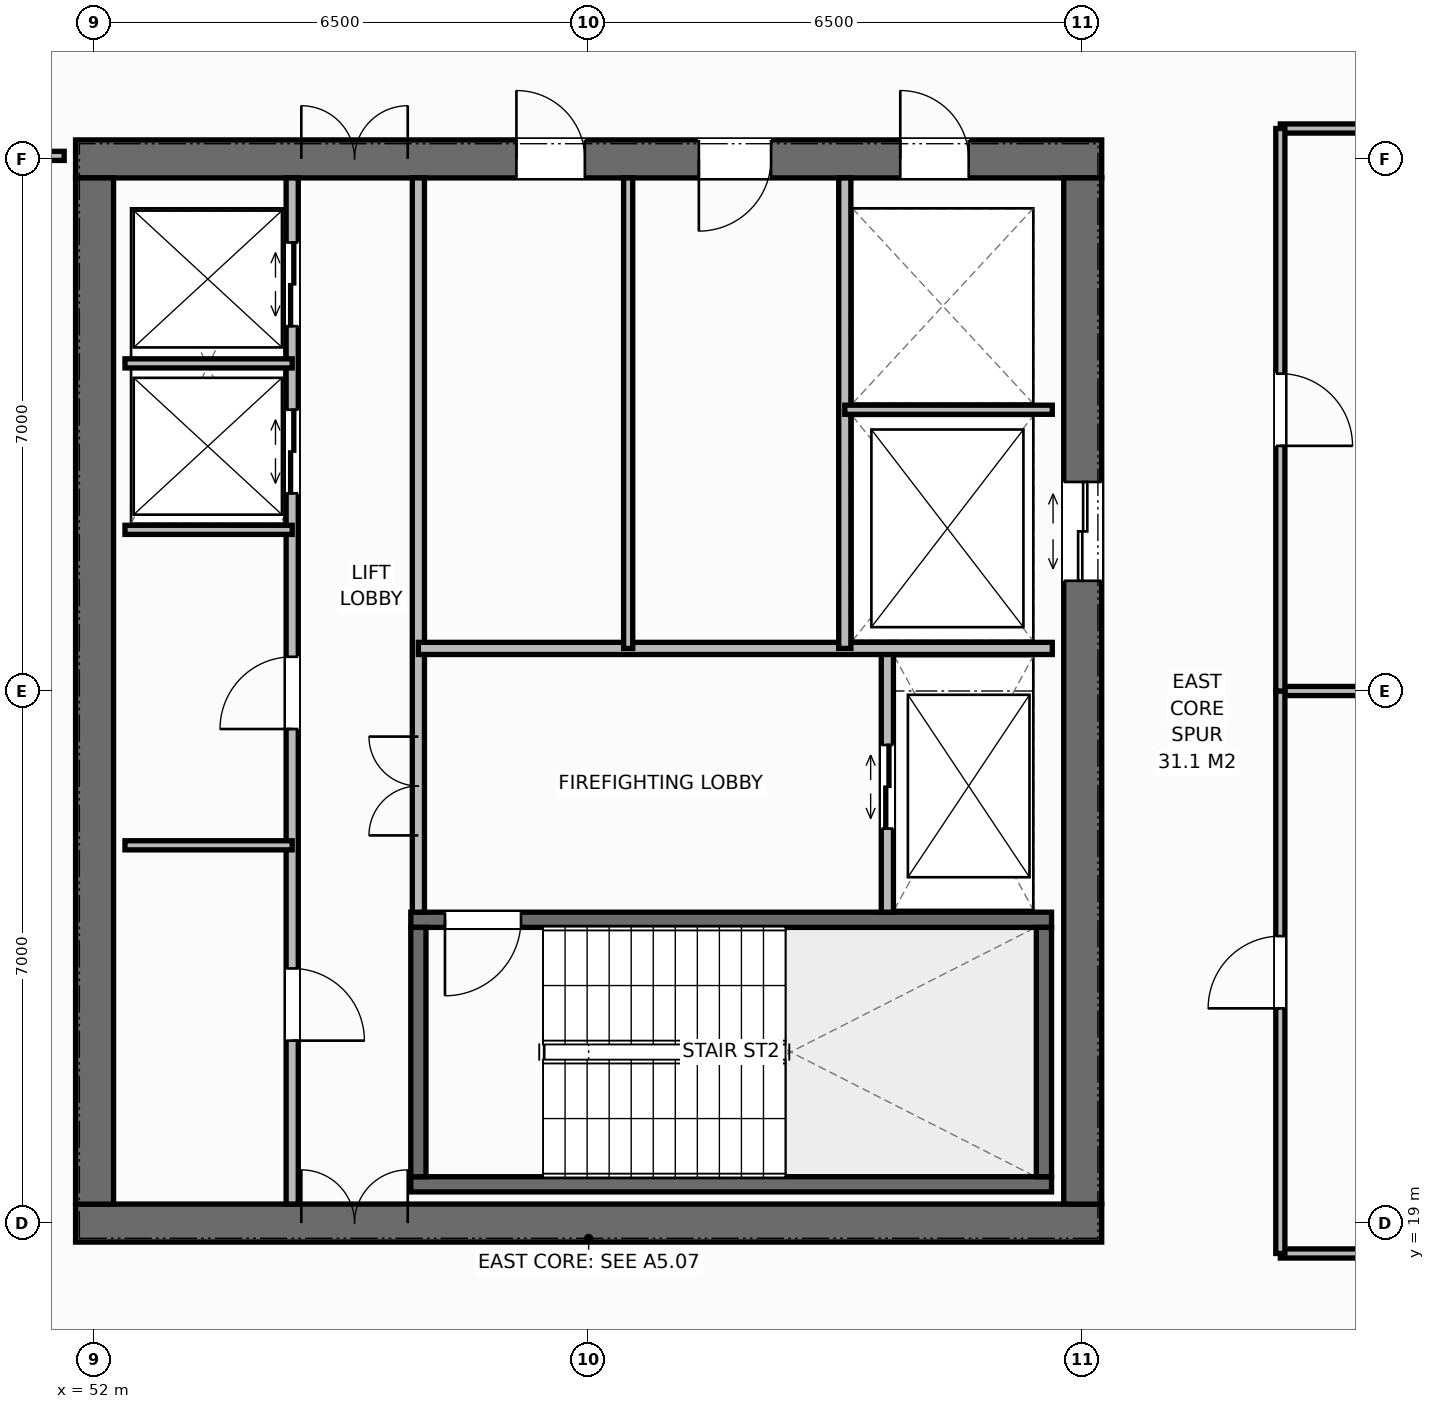
"""IFC4 building model, lengths in metres.
Left out: names, types, materials, properties, quantities, classifications, styles, units other than length and angle.
Written with IfcOpenShell. Run it as: python <this file> out.ifc"""

import sys

from ifc_helpers import new_model, si_unit, direction, frame, frame_2d, origin, place, context, subcontext, project, spatial, rectangle, extrude, element, fill, save


model = new_model("IFC4")
c1 = context("Model", 3, precision=1e-05, world=origin(), true_north=direction((0.0, 1.0)))
c2 = subcontext(c1, "Body", "Model", "MODEL_VIEW")
j1 = project(units=[si_unit("LENGTHUNIT", "METRE"), si_unit("PLANEANGLEUNIT", "RADIAN")], contexts=[c1])
p1 = place(None, origin())
s1 = spatial("IfcSite", under=j1, at=p1, CompositionType="ELEMENT")
p2 = place(p1, origin())
s2 = spatial("IfcBuilding", under=s1, at=p2, CompositionType="ELEMENT")
p3 = place(p2, frame((0.0, 0.0, 306.4)))
s3 = spatial("IfcBuildingStorey", under=s2, at=p3, CompositionType="ELEMENT", Elevation=306.4)
p4 = place(p3, frame((51.75, 19.0, 0.0), z_axis=(0.0, 0.0, 1.0), x_axis=(1.0, 0.0, 0.0)))
e1 = element("IfcWall", 1, at=p4, inside=s3, PredefinedType="SHEAR", context=c2, shape_type="SweptSolid", body=[
    extrude(rectangle(XDim=13.5, YDim=0.5, at=frame_2d((6.75, 0.0))), origin(), (0.0, 0.0, 1.0), 4.0),
])
p5 = place(p4, frame((2.97, 0.0, 0.0)))
e2 = element("IfcOpeningElement", 2, at=p5, cuts=e1, PredefinedType="OPENING", context=c2, shape_type="SweptSolid", body=[
    extrude(rectangle(XDim=1.4, YDim=2.2, at=frame_2d((0.7, 1.1))), frame((0.0, 0.26, 0.0), z_axis=(0.0, -1.0, 0.0), x_axis=(1.0, 0.0, 0.0)), (0.0, 0.0, 1.0), 0.52),
])
p6 = place(p3, frame((51.75, 33.0, 0.0), z_axis=(0.0, 0.0, 1.0), x_axis=(1.0, 0.0, 0.0)))
e3 = element("IfcWall", 3, at=p6, inside=s3, PredefinedType="SHEAR", context=c2, shape_type="SweptSolid", body=[
    extrude(rectangle(XDim=13.5, YDim=0.5, at=frame_2d((6.75, 0.0))), origin(), (0.0, 0.0, 1.0), 4.0),
])
p7 = place(p6, frame((2.97, 0.0, 0.0)))
e4 = element("IfcOpeningElement", 4, at=p7, cuts=e3, PredefinedType="OPENING", context=c2, shape_type="SweptSolid", body=[
    extrude(rectangle(XDim=1.4, YDim=2.2, at=frame_2d((0.7, 1.1))), frame((0.0, 0.26, 0.0), z_axis=(0.0, -1.0, 0.0), x_axis=(1.0, 0.0, 0.0)), (0.0, 0.0, 1.0), 0.52),
])
p8 = place(p6, frame((10.85, 0.0, 0.0)))
e5 = element("IfcOpeningElement", 5, at=p8, cuts=e3, PredefinedType="OPENING", context=c2, shape_type="SweptSolid", body=[
    extrude(rectangle(XDim=0.9, YDim=2.15, at=frame_2d((0.45, 1.075))), frame((0.0, 0.26, 0.0), z_axis=(0.0, -1.0, 0.0), x_axis=(1.0, 0.0, 0.0)), (0.0, 0.0, 1.0), 0.52),
])
p9 = place(p6, frame((5.8, 0.0, 0.0)))
e6 = element("IfcOpeningElement", 6, at=p9, cuts=e3, PredefinedType="OPENING", context=c2, shape_type="SweptSolid", body=[
    extrude(rectangle(XDim=0.9, YDim=2.15, at=frame_2d((0.45, 1.075))), frame((0.0, 0.26, 0.0), z_axis=(0.0, -1.0, 0.0), x_axis=(1.0, 0.0, 0.0)), (0.0, 0.0, 1.0), 0.52),
])
p10 = place(p6, frame((8.2, 0.0, 0.0)))
e7 = element("IfcOpeningElement", 7, at=p10, cuts=e3, PredefinedType="OPENING", context=c2, shape_type="SweptSolid", body=[
    extrude(rectangle(XDim=0.95, YDim=2.15, at=frame_2d((0.475, 1.075))), frame((0.0, 0.26, 0.0), z_axis=(0.0, -1.0, 0.0), x_axis=(1.0, 0.0, 0.0)), (0.0, 0.0, 1.0), 0.52),
])
p11 = place(p3, frame((52.0, 19.25, 0.0), z_axis=(0.0, 0.0, 1.0), x_axis=(0.0, 1.0, 0.0)))
e8 = element("IfcWall", 8, at=p11, inside=s3, PredefinedType="SHEAR", context=c2, shape_type="SweptSolid", body=[
    extrude(rectangle(XDim=13.5, YDim=0.5, at=frame_2d((6.75, 0.0))), origin(), (0.0, 0.0, 1.0), 4.0),
])
p12 = place(p3, frame((65.0, 19.25, 0.0), z_axis=(0.0, 0.0, 1.0), x_axis=(0.0, 1.0, 0.0)))
e9 = element("IfcWall", 9, at=p12, inside=s3, PredefinedType="SHEAR", context=c2, shape_type="SweptSolid", body=[
    extrude(rectangle(XDim=13.5, YDim=0.5, at=frame_2d((6.75, 0.0))), origin(), (0.0, 0.0, 1.0), 4.0),
])
p13 = place(p12, frame((8.2, 0.0, 0.0)))
e10 = element("IfcOpeningElement", 10, at=p13, cuts=e9, PredefinedType="OPENING", context=c2, shape_type="SweptSolid", body=[
    extrude(rectangle(XDim=1.3, YDim=2.2, at=frame_2d((0.65, 1.1))), frame((0.0, 0.26, 0.0), z_axis=(0.0, -1.0, 0.0), x_axis=(1.0, 0.0, 0.0)), (0.0, 0.0, 1.0), 0.52),
])
p14 = place(p3, frame((56.16, 19.51, 0.0), z_axis=(0.0, 0.0, 1.0), x_axis=(1.0, 0.0, 0.0)))
e11 = element("IfcWall", 11, at=p14, inside=s3, PredefinedType="SHEAR", context=c2, shape_type="SweptSolid", body=[
    extrude(rectangle(XDim=8.43, YDim=0.2, at=frame_2d((4.215, 0.0))), origin(), (0.0, 0.0, 1.0), 4.0),
])
p15 = place(p3, frame((56.16, 22.99, 0.0), z_axis=(0.0, 0.0, 1.0), x_axis=(1.0, 0.0, 0.0)))
e12 = element("IfcWall", 12, at=p15, inside=s3, PredefinedType="SHEAR", context=c2, shape_type="SweptSolid", body=[
    extrude(rectangle(XDim=8.43, YDim=0.2, at=frame_2d((4.215, 0.0))), origin(), (0.0, 0.0, 1.0), 4.0),
])
p16 = place(p15, frame((0.45, 0.0, 0.0)))
e13 = element("IfcOpeningElement", 13, at=p16, cuts=e12, PredefinedType="OPENING", context=c2, shape_type="SweptSolid", body=[
    extrude(rectangle(XDim=1.0, YDim=2.15, at=frame_2d((0.5, 1.075))), frame((0.0, 0.11, 0.0), z_axis=(0.0, -1.0, 0.0), x_axis=(1.0, 0.0, 0.0)), (0.0, 0.0, 1.0), 0.22),
])
for number, where, z_axis, x_axis in (
    (14, (56.26, 19.61, 0.0), (0.0, 0.0, 1.0), (0.0, 1.0, 0.0)),
    (15, (64.49, 19.61, 0.0), (0.0, 0.0, 1.0), (0.0, 1.0, 0.0)),
):
    element("IfcWall", number, at=place(p3, frame(where, z_axis=z_axis, x_axis=x_axis)), inside=s3, PredefinedType="SHEAR", context=c2, shape_type="SweptSolid", body=[
        extrude(rectangle(XDim=3.28, YDim=0.2, at=frame_2d((1.64, 0.0))), origin(), (0.0, 0.0, 1.0), 4.0),
    ])
p17 = place(p3, frame((54.6, 19.25, 0.0), z_axis=(0.0, 0.0, 1.0), x_axis=(0.0, 1.0, 0.0)))
e16 = element("IfcWall", 16, at=p17, inside=s3, PredefinedType="STANDARD", context=c2, shape_type="SweptSolid", body=[
    extrude(rectangle(XDim=13.5, YDim=0.16, at=frame_2d((6.75, 0.0))), origin(), (0.0, 0.0, 1.0), 3.72),
])
p18 = place(p17, frame((2.15, 0.0, 0.0)))
e17 = element("IfcOpeningElement", 17, at=p18, cuts=e16, PredefinedType="OPENING", context=c2, shape_type="SweptSolid", body=[
    extrude(rectangle(XDim=0.95, YDim=2.15, at=frame_2d((0.475, 1.075))), frame((0.0, 0.09, 0.0), z_axis=(0.0, -1.0, 0.0), x_axis=(1.0, 0.0, 0.0)), (0.0, 0.0, 1.0), 0.18),
])
p19 = place(p17, frame((6.25, 0.0, 0.0)))
e18 = element("IfcOpeningElement", 18, at=p19, cuts=e16, PredefinedType="OPENING", context=c2, shape_type="SweptSolid", body=[
    extrude(rectangle(XDim=0.95, YDim=2.15, at=frame_2d((0.475, 1.075))), frame((0.0, 0.09, 0.0), z_axis=(0.0, -1.0, 0.0), x_axis=(1.0, 0.0, 0.0)), (0.0, 0.0, 1.0), 0.18),
])
p20 = place(p17, frame((9.35, 0.0, 0.0)))
e19 = element("IfcOpeningElement", 19, at=p20, cuts=e16, PredefinedType="OPENING", context=c2, shape_type="SweptSolid", body=[
    extrude(rectangle(XDim=1.1, YDim=2.2, at=frame_2d((0.55, 1.1))), frame((0.0, 0.09, 0.0), z_axis=(0.0, -1.0, 0.0), x_axis=(1.0, 0.0, 0.0)), (0.0, 0.0, 1.0), 0.18),
])
p21 = place(p17, frame((11.55, 0.0, 0.0)))
e20 = element("IfcOpeningElement", 20, at=p21, cuts=e16, PredefinedType="OPENING", context=c2, shape_type="SweptSolid", body=[
    extrude(rectangle(XDim=1.1, YDim=2.2, at=frame_2d((0.55, 1.1))), frame((0.0, 0.09, 0.0), z_axis=(0.0, -1.0, 0.0), x_axis=(1.0, 0.0, 0.0)), (0.0, 0.0, 1.0), 0.18),
])
p22 = place(p3, frame((56.26, 23.09, 0.0), z_axis=(0.0, 0.0, 1.0), x_axis=(0.0, 1.0, 0.0)))
e21 = element("IfcWall", 21, at=p22, inside=s3, PredefinedType="STANDARD", context=c2, shape_type="SweptSolid", body=[
    extrude(rectangle(XDim=9.66, YDim=0.16, at=frame_2d((4.83, 0.0))), origin(), (0.0, 0.0, 1.0), 3.72),
])
p23 = place(p22, frame((1.01, 0.0, 0.0)))
e22 = element("IfcOpeningElement", 22, at=p23, cuts=e21, PredefinedType="OPENING", context=c2, shape_type="SweptSolid", body=[
    extrude(rectangle(XDim=1.3, YDim=2.2, at=frame_2d((0.65, 1.1))), frame((0.0, 0.09, 0.0), z_axis=(0.0, -1.0, 0.0), x_axis=(1.0, 0.0, 0.0)), (0.0, 0.0, 1.0), 0.18),
])
for number, where, z_axis, x_axis in (
    (23, (52.4, 23.97, 0.0), (0.0, 0.0, 1.0), (1.0, 0.0, 0.0)),
    (24, (52.4, 28.12, 0.0), (0.0, 0.0, 1.0), (1.0, 0.0, 0.0)),
    (25, (52.4, 30.31, 0.0), (0.0, 0.0, 1.0), (1.0, 0.0, 0.0)),
):
    element("IfcWall", number, at=place(p3, frame(where, z_axis=z_axis, x_axis=x_axis)), inside=s3, PredefinedType="PARTITIONING", context=c2, shape_type="SweptSolid", body=[
        extrude(rectangle(XDim=2.2, YDim=0.12, at=frame_2d((1.1, 0.0))), origin(), (0.0, 0.0, 1.0), 3.72),
    ])
p24 = place(p3, frame((62.43, 23.09, 0.0), z_axis=(0.0, 0.0, 1.0), x_axis=(0.0, 1.0, 0.0)))
e26 = element("IfcWall", 26, at=p24, inside=s3, PredefinedType="STANDARD", context=c2, shape_type="SweptSolid", body=[
    extrude(rectangle(XDim=3.47, YDim=0.16, at=frame_2d((1.735, 0.0))), origin(), (0.0, 0.0, 1.0), 3.72),
])
p25 = place(p24, frame((1.1, 0.0, 0.0)))
e27 = element("IfcOpeningElement", 27, at=p25, cuts=e26, PredefinedType="OPENING", context=c2, shape_type="SweptSolid", body=[
    extrude(rectangle(XDim=1.1, YDim=2.2, at=frame_2d((0.55, 1.1))), frame((0.0, 0.09, 0.0), z_axis=(0.0, -1.0, 0.0), x_axis=(1.0, 0.0, 0.0)), (0.0, 0.0, 1.0), 0.18),
])
p26 = place(p3, frame((56.26, 26.56, 0.0), z_axis=(0.0, 0.0, 1.0), x_axis=(1.0, 0.0, 0.0)))
e28 = element("IfcWall", 28, at=p26, inside=s3, PredefinedType="STANDARD", context=c2, shape_type="SweptSolid", body=[
    extrude(rectangle(XDim=8.34, YDim=0.16, at=frame_2d((4.17, 0.0))), origin(), (0.0, 0.0, 1.0), 3.72),
])
p27 = place(p3, frame((61.87, 26.56, 0.0), z_axis=(0.0, 0.0, 1.0), x_axis=(0.0, 1.0, 0.0)))
e29 = element("IfcWall", 29, at=p27, inside=s3, PredefinedType="STANDARD", context=c2, shape_type="SweptSolid", body=[
    extrude(rectangle(XDim=6.19, YDim=0.16, at=frame_2d((3.095, 0.0))), origin(), (0.0, 0.0, 1.0), 3.72),
])
p28 = place(p3, frame((61.87, 29.7, 0.0), z_axis=(0.0, 0.0, 1.0), x_axis=(1.0, 0.0, 0.0)))
e30 = element("IfcWall", 30, at=p28, inside=s3, PredefinedType="PARTITIONING", context=c2, shape_type="SweptSolid", body=[
    extrude(rectangle(XDim=2.73, YDim=0.12, at=frame_2d((1.365, 0.0))), origin(), (0.0, 0.0, 1.0), 3.72),
])
p29 = place(p3, frame((59.02, 26.56, 0.0), z_axis=(0.0, 0.0, 1.0), x_axis=(0.0, 1.0, 0.0)))
e31 = element("IfcWall", 31, at=p29, inside=s3, PredefinedType="PARTITIONING", context=c2, shape_type="SweptSolid", body=[
    extrude(rectangle(XDim=6.19, YDim=0.12, at=frame_2d((3.095, 0.0))), origin(), (0.0, 0.0, 1.0), 3.72),
])
p30 = place(p3, frame((48.0, 33.04, 0.0), z_axis=(0.0, 0.0, 1.0), x_axis=(1.0, 0.0, 0.0)))
e32 = element("IfcWall", 32, at=p30, inside=s3, PredefinedType="PARTITIONING", context=c2, shape_type="SweptSolid", body=[
    extrude(rectangle(XDim=3.6, YDim=0.12, at=frame_2d((1.8, 0.0))), origin(), (0.0, 0.0, 1.0), 3.46),
])
p31 = place(p30, frame((1.1, 0.0, 0.0)))
e33 = element("IfcOpeningElement", 33, at=p31, cuts=e32, PredefinedType="OPENING", context=c2, shape_type="SweptSolid", body=[
    extrude(rectangle(XDim=0.95, YDim=2.15, at=frame_2d((0.475, 1.075))), frame((0.0, 0.07, 0.0), z_axis=(0.0, -1.0, 0.0), x_axis=(1.0, 0.0, 0.0)), (0.0, 0.0, 1.0), 0.14),
])
for number, where, z_axis, x_axis in (
    (34, (67.6, 18.6, 0.0), (0.0, 0.0, 1.0), (1.0, 0.0, 0.0)),
    (35, (67.6, 33.4, 0.0), (0.0, 0.0, 1.0), (1.0, 0.0, 0.0)),
    (36, (67.6, 26.0, 0.0), (0.0, 0.0, 1.0), (1.0, 0.0, 0.0)),
):
    element("IfcWall", number, at=place(p3, frame(where, z_axis=z_axis, x_axis=x_axis)), inside=s3, PredefinedType="PARTITIONING", context=c2, shape_type="SweptSolid", body=[
        extrude(rectangle(XDim=6.48, YDim=0.12, at=frame_2d((3.24, 0.0))), origin(), (0.0, 0.0, 1.0), 3.72),
    ])
p32 = place(p3, frame((67.6, 18.6, 0.0), z_axis=(0.0, 0.0, 1.0), x_axis=(0.0, 1.0, 0.0)))
e37 = element("IfcWall", 37, at=p32, inside=s3, PredefinedType="PARTITIONING", context=c2, shape_type="SweptSolid", body=[
    extrude(rectangle(XDim=7.4, YDim=0.12, at=frame_2d((3.7, 0.0))), origin(), (0.0, 0.0, 1.0), 3.72),
])
p33 = place(p32, frame((3.225, 0.0, 0.0)))
e38 = element("IfcOpeningElement", 38, at=p33, cuts=e37, PredefinedType="OPENING", context=c2, shape_type="SweptSolid", body=[
    extrude(rectangle(XDim=0.95, YDim=2.15, at=frame_2d((0.475, 1.075))), frame((0.0, 0.07, 0.0), z_axis=(0.0, -1.0, 0.0), x_axis=(1.0, 0.0, 0.0)), (0.0, 0.0, 1.0), 0.14),
])
p34 = place(p3, frame((67.6, 26.0, 0.0), z_axis=(0.0, 0.0, 1.0), x_axis=(0.0, 1.0, 0.0)))
e39 = element("IfcWall", 39, at=p34, inside=s3, PredefinedType="PARTITIONING", context=c2, shape_type="SweptSolid", body=[
    extrude(rectangle(XDim=7.4, YDim=0.12, at=frame_2d((3.7, 0.0))), origin(), (0.0, 0.0, 1.0), 3.72),
])
p35 = place(p34, frame((3.225, 0.0, 0.0)))
e40 = element("IfcOpeningElement", 40, at=p35, cuts=e39, PredefinedType="OPENING", context=c2, shape_type="SweptSolid", body=[
    extrude(rectangle(XDim=0.95, YDim=2.15, at=frame_2d((0.475, 1.075))), frame((0.0, 0.07, 0.0), z_axis=(0.0, -1.0, 0.0), x_axis=(1.0, 0.0, 0.0)), (0.0, 0.0, 1.0), 0.14),
])
p36 = place(p5, origin())
e41 = element("IfcDoor", 41, at=p36, inside=s3, OperationType="DOUBLE_DOOR_SINGLE_SWING", PredefinedType="DOOR", context=c2, shape_type="SweptSolid", body=[
    extrude(rectangle(XDim=1.4, YDim=2.2, at=frame_2d((0.7, 1.1))), frame((0.0, 0.075, 0.0), z_axis=(0.0, -1.0, 0.0), x_axis=(1.0, 0.0, 0.0)), (0.0, 0.0, 1.0), 0.05),
])
fill(e2, e41)
p37 = place(p7, origin())
e42 = element("IfcDoor", 42, at=p37, inside=s3, OperationType="DOUBLE_DOOR_SINGLE_SWING", PredefinedType="DOOR", context=c2, shape_type="SweptSolid", body=[
    extrude(rectangle(XDim=1.4, YDim=2.2, at=frame_2d((0.7, 1.1))), frame((0.0, -0.025, 0.0), z_axis=(0.0, -1.0, 0.0), x_axis=(1.0, 0.0, 0.0)), (0.0, 0.0, 1.0), 0.05),
])
fill(e4, e42)
p38 = place(p18, origin())
e43 = element("IfcDoor", 43, at=p38, inside=s3, OperationType="SINGLE_SWING_RIGHT", PredefinedType="DOOR", context=c2, shape_type="SweptSolid", body=[
    extrude(rectangle(XDim=0.95, YDim=2.15, at=frame_2d((0.475, 1.075))), frame((0.0, 0.025, 0.0), z_axis=(0.0, -1.0, 0.0), x_axis=(1.0, 0.0, 0.0)), (0.0, 0.0, 1.0), 0.05),
])
fill(e17, e43)
p39 = place(p19, origin())
e44 = element("IfcDoor", 44, at=p39, inside=s3, OperationType="SINGLE_SWING_LEFT", PredefinedType="DOOR", context=c2, shape_type="SweptSolid", body=[
    extrude(rectangle(XDim=0.95, YDim=2.15, at=frame_2d((0.475, 1.075))), frame((0.0, 0.025, 0.0), z_axis=(0.0, -1.0, 0.0), x_axis=(1.0, 0.0, 0.0)), (0.0, 0.0, 1.0), 0.05),
])
fill(e18, e44)
p40 = place(p20, origin())
e45 = element("IfcDoor", 45, at=p40, inside=s3, OperationType="DOUBLE_DOOR_SLIDING", PredefinedType="DOOR", context=c2, shape_type="SweptSolid", body=[
    extrude(rectangle(XDim=1.1, YDim=2.2, at=frame_2d((0.55, 1.1))), frame((0.0, 0.025, 0.0), z_axis=(0.0, -1.0, 0.0), x_axis=(1.0, 0.0, 0.0)), (0.0, 0.0, 1.0), 0.05),
])
fill(e19, e45)
p41 = place(p21, origin())
e46 = element("IfcDoor", 46, at=p41, inside=s3, OperationType="DOUBLE_DOOR_SLIDING", PredefinedType="DOOR", context=c2, shape_type="SweptSolid", body=[
    extrude(rectangle(XDim=1.1, YDim=2.2, at=frame_2d((0.55, 1.1))), frame((0.0, 0.025, 0.0), z_axis=(0.0, -1.0, 0.0), x_axis=(1.0, 0.0, 0.0)), (0.0, 0.0, 1.0), 0.05),
])
fill(e20, e46)
p42 = place(p16, origin())
e47 = element("IfcDoor", 47, at=p42, inside=s3, OperationType="SINGLE_SWING_RIGHT", PredefinedType="DOOR", context=c2, shape_type="SweptSolid", body=[
    extrude(rectangle(XDim=1.0, YDim=2.15, at=frame_2d((0.5, 1.075))), frame((0.0, 0.025, 0.0), z_axis=(0.0, -1.0, 0.0), x_axis=(1.0, 0.0, 0.0)), (0.0, 0.0, 1.0), 0.05),
])
fill(e13, e47)
p43 = place(p25, origin())
e48 = element("IfcDoor", 48, at=p43, inside=s3, OperationType="DOUBLE_DOOR_SLIDING", PredefinedType="DOOR", context=c2, shape_type="SweptSolid", body=[
    extrude(rectangle(XDim=1.1, YDim=2.2, at=frame_2d((0.55, 1.1))), frame((0.0, 0.025, 0.0), z_axis=(0.0, -1.0, 0.0), x_axis=(1.0, 0.0, 0.0)), (0.0, 0.0, 1.0), 0.05),
])
fill(e27, e48)
p44 = place(p23, origin())
e49 = element("IfcDoor", 49, at=p44, inside=s3, OperationType="DOUBLE_DOOR_SINGLE_SWING", PredefinedType="DOOR", context=c2, shape_type="SweptSolid", body=[
    extrude(rectangle(XDim=1.3, YDim=2.2, at=frame_2d((0.65, 1.1))), frame((0.0, 0.025, 0.0), z_axis=(0.0, -1.0, 0.0), x_axis=(1.0, 0.0, 0.0)), (0.0, 0.0, 1.0), 0.05),
])
fill(e22, e49)
p45 = place(p13, origin())
e50 = element("IfcDoor", 50, at=p45, inside=s3, OperationType="DOUBLE_DOOR_SLIDING", PredefinedType="DOOR", context=c2, shape_type="SweptSolid", body=[
    extrude(rectangle(XDim=1.3, YDim=2.2, at=frame_2d((0.65, 1.1))), frame((0.0, 0.025, 0.0), z_axis=(0.0, -1.0, 0.0), x_axis=(1.0, 0.0, 0.0)), (0.0, 0.0, 1.0), 0.05),
])
fill(e10, e50)
p46 = place(p8, origin())
e51 = element("IfcDoor", 51, at=p46, inside=s3, OperationType="SINGLE_SWING_LEFT", PredefinedType="DOOR", context=c2, shape_type="SweptSolid", body=[
    extrude(rectangle(XDim=0.9, YDim=2.15, at=frame_2d((0.45, 1.075))), frame((0.0, -0.025, 0.0), z_axis=(0.0, -1.0, 0.0), x_axis=(1.0, 0.0, 0.0)), (0.0, 0.0, 1.0), 0.05),
])
fill(e5, e51)
p47 = place(p9, origin())
e52 = element("IfcDoor", 52, at=p47, inside=s3, OperationType="SINGLE_SWING_LEFT", PredefinedType="DOOR", context=c2, shape_type="SweptSolid", body=[
    extrude(rectangle(XDim=0.9, YDim=2.15, at=frame_2d((0.45, 1.075))), frame((0.0, -0.025, 0.0), z_axis=(0.0, -1.0, 0.0), x_axis=(1.0, 0.0, 0.0)), (0.0, 0.0, 1.0), 0.05),
])
fill(e6, e52)
p48 = place(p10, origin())
e53 = element("IfcDoor", 53, at=p48, inside=s3, OperationType="SINGLE_SWING_RIGHT", PredefinedType="DOOR", context=c2, shape_type="SweptSolid", body=[
    extrude(rectangle(XDim=0.95, YDim=2.15, at=frame_2d((0.475, 1.075))), frame((0.0, -0.025, 0.0), z_axis=(0.0, -1.0, 0.0), x_axis=(1.0, 0.0, 0.0)), (0.0, 0.0, 1.0), 0.05),
])
fill(e7, e53)
p49 = place(p33, origin())
e54 = element("IfcDoor", 54, at=p49, inside=s3, OperationType="SINGLE_SWING_LEFT", PredefinedType="DOOR", context=c2, shape_type="SweptSolid", body=[
    extrude(rectangle(XDim=0.95, YDim=2.15, at=frame_2d((0.475, 1.075))), frame((0.0, 0.025, 0.0), z_axis=(0.0, -1.0, 0.0), x_axis=(1.0, 0.0, 0.0)), (0.0, 0.0, 1.0), 0.05),
])
fill(e38, e54)
p50 = place(p35, origin())
e55 = element("IfcDoor", 55, at=p50, inside=s3, OperationType="SINGLE_SWING_RIGHT", PredefinedType="DOOR", context=c2, shape_type="SweptSolid", body=[
    extrude(rectangle(XDim=0.95, YDim=2.15, at=frame_2d((0.475, 1.075))), frame((0.0, 0.025, 0.0), z_axis=(0.0, -1.0, 0.0), x_axis=(1.0, 0.0, 0.0)), (0.0, 0.0, 1.0), 0.05),
])
fill(e40, e55)
save(model, sys.argv[1])
